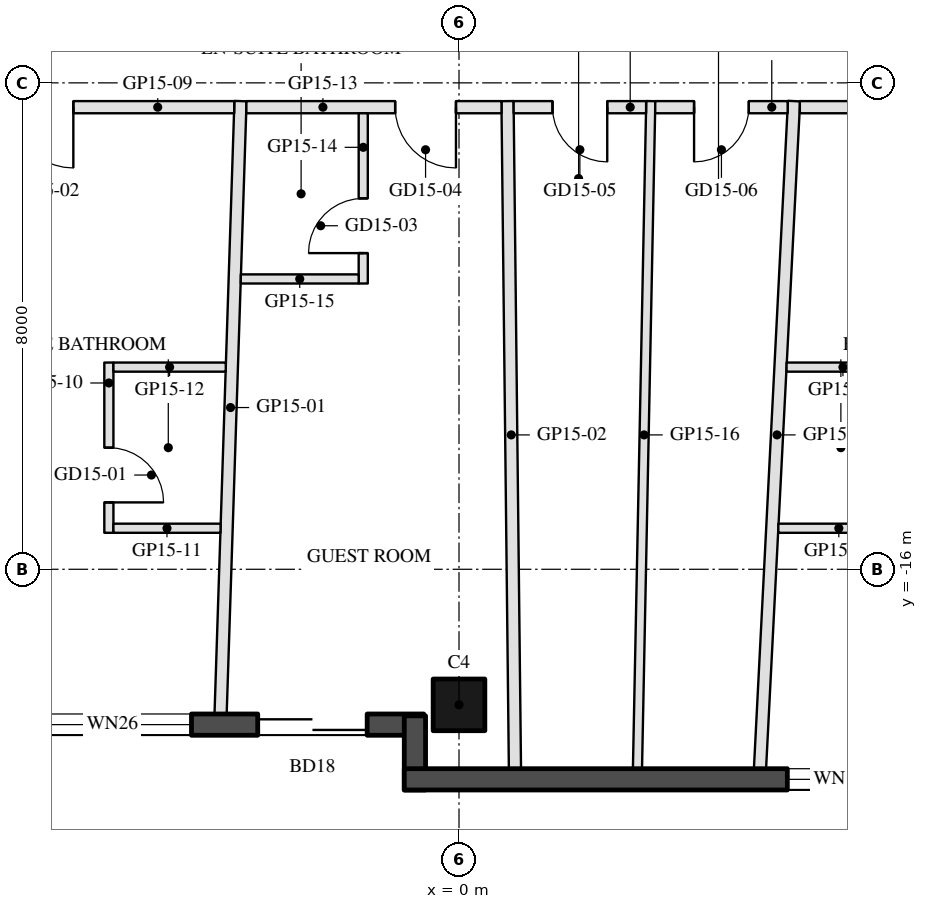
"""IFC4 building model, lengths in metres.
Left out: names, types, materials, properties, quantities, classifications, styles, units other than length and angle.
Written with IfcOpenShell. Run it as: python <this file> out.ifc"""

import sys

from ifc_helpers import new_model, si_unit, direction, frame, frame_2d, origin, origin_2d, place, context, subcontext, project, spatial, rectangle, hollow_rectangle, extrude, element, fill, save


model = new_model("IFC4")
c1 = context("Model", 3, precision=1e-05, world=origin(), true_north=direction((0.0, 1.0)))
c2 = subcontext(c1, "Body", "Model", "MODEL_VIEW")
j1 = project(units=[si_unit("LENGTHUNIT", "METRE"), si_unit("PLANEANGLEUNIT", "RADIAN")], contexts=[c1])
p1 = place(None, origin())
s1 = spatial("IfcSite", under=j1, at=p1, CompositionType="ELEMENT")
p2 = place(p1, origin())
s2 = spatial("IfcBuilding", under=s1, at=p2, CompositionType="ELEMENT")
p3 = place(p2, frame((0.0, 0.0, 168.8)))
s3 = spatial("IfcBuildingStorey", under=s2, at=p3, CompositionType="ELEMENT", Elevation=168.8)
p4 = place(p3, frame((0.0, -18.23, 0.0), z_axis=(0.0, 0.0, 1.0), x_axis=(-1.0, 0.0, 0.0)))
e1 = element("IfcColumn", 1, at=p4, inside=s3, PredefinedType="COLUMN", context=c2, shape_type="SweptSolid", body=[
    extrude(hollow_rectangle(XDim=0.85, YDim=0.85, WallThickness=0.04, at=origin_2d()), origin(), (0.0, 0.0, 1.0), 3.7),
])
p5 = place(p3, frame((-7.32, -18.555, 0.0), z_axis=(0.0, 0.0, 1.0), x_axis=(1.0, 0.0, 0.0)))
e2 = element("IfcWall", 2, at=p5, inside=s3, PredefinedType="SOLIDWALL", context=c2, shape_type="SweptSolid", body=[
    extrude(rectangle(XDim=6.74, YDim=0.35, at=frame_2d((3.37, 0.0))), origin(), (0.0, 0.0, 1.0), 3.55),
])
p6 = place(p5, frame((0.32, 0.0, 0.3)))
e3 = element("IfcOpeningElement", 3, at=p6, cuts=e2, PredefinedType="OPENING", context=c2, shape_type="SweptSolid", body=[
    extrude(rectangle(XDim=2.6, YDim=2.65, at=frame_2d((1.3, 1.325))), frame((0.0, 0.185, 0.0), z_axis=(0.0, -1.0, 0.0), x_axis=(1.0, 0.0, 0.0)), (0.0, 0.0, 1.0), 0.37),
])
p7 = place(p5, frame((4.01, 0.0, 0.0)))
e4 = element("IfcOpeningElement", 4, at=p7, cuts=e2, PredefinedType="OPENING", context=c2, shape_type="SweptSolid", body=[
    extrude(rectangle(XDim=1.8, YDim=2.4, at=frame_2d((0.9, 1.2))), frame((0.0, 0.185, 0.0), z_axis=(0.0, -1.0, 0.0), x_axis=(1.0, 0.0, 0.0)), (0.0, 0.0, 1.0), 0.37),
])
p8 = place(p3, frame((-0.725, -18.41, 0.0), z_axis=(0.0, 0.0, 1.0), x_axis=(0.0, -1.0, 0.0)))
e5 = element("IfcWall", 5, at=p8, inside=s3, PredefinedType="SOLIDWALL", context=c2, shape_type="SweptSolid", body=[
    extrude(rectangle(XDim=1.22, YDim=0.35, at=frame_2d((0.61, 0.0))), origin(), (0.0, 0.0, 1.0), 3.55),
])
p9 = place(p3, frame((-0.9, -19.455, 0.0), z_axis=(0.0, 0.0, 1.0), x_axis=(1.0, 0.0, 0.0)))
e6 = element("IfcWall", 6, at=p9, inside=s3, PredefinedType="SOLIDWALL", context=c2, shape_type="SweptSolid", body=[
    extrude(rectangle(XDim=9.7, YDim=0.35, at=frame_2d((4.85, 0.0))), origin(), (0.0, 0.0, 1.0), 3.55),
])
p10 = place(p9, frame((6.3, 0.0, 0.3)))
e7 = element("IfcOpeningElement", 7, at=p10, cuts=e6, PredefinedType="OPENING", context=c2, shape_type="SweptSolid", body=[
    extrude(rectangle(XDim=1.7, YDim=2.65, at=frame_2d((0.85, 1.325))), frame((0.0, 0.185, 0.0), z_axis=(0.0, -1.0, 0.0), x_axis=(1.0, 0.0, 0.0)), (0.0, 0.0, 1.0), 0.37),
])
p11 = place(p3, frame((-3.921, -18.38, 0.0), z_axis=(0.0, 0.0, 1.0), x_axis=(0.032462838588, 0.999472943161, 0.0)))
e8 = element("IfcWall", 8, at=p11, inside=s3, PredefinedType="PARTITIONING", context=c2, shape_type="SweptSolid", body=[
    extrude(rectangle(XDim=10.085, YDim=0.2, at=frame_2d((5.042, 0.0))), origin(), (0.0, 0.0, 1.0), 2.95),
])
p12 = place(p3, frame((0.92, -19.28, 0.0), z_axis=(0.0, 0.0, 1.0), x_axis=(-0.011116847578, 0.999938205941, 0.0)))
e9 = element("IfcWall", 9, at=p12, inside=s3, PredefinedType="PARTITIONING", context=c2, shape_type="SweptSolid", body=[
    extrude(rectangle(XDim=10.981, YDim=0.2, at=frame_2d((5.49, 0.0))), origin(), (0.0, 0.0, 1.0), 3.06),
])
p13 = place(p3, frame((4.95, -19.28, 0.0), z_axis=(0.0, 0.0, 1.0), x_axis=(0.050963172582, 0.998700533213, 0.0)))
e10 = element("IfcWall", 10, at=p13, inside=s3, PredefinedType="PARTITIONING", context=c2, shape_type="SweptSolid", body=[
    extrude(rectangle(XDim=10.994, YDim=0.2, at=frame_2d((5.497, 0.0))), origin(), (0.0, 0.0, 1.0), 3.06),
])
p14 = place(p3, frame((-3.697, -8.4, 0.0), z_axis=(0.0, 0.0, 1.0), x_axis=(-1.0, 0.0, 0.0)))
e11 = element("IfcWall", 11, at=p14, inside=s3, PredefinedType="PARTITIONING", context=c2, shape_type="SweptSolid", body=[
    extrude(rectangle(XDim=6.292, YDim=0.2, at=frame_2d((3.146, 0.0))), origin(), (0.0, 0.0, 1.0), 2.95),
])
p15 = place(p14, frame((2.646, 0.0, 0.0)))
e12 = element("IfcOpeningElement", 12, at=p15, cuts=e11, PredefinedType="OPENING", context=c2, shape_type="SweptSolid", body=[
    extrude(rectangle(XDim=1.0, YDim=2.1, at=frame_2d((0.5, 1.05))), frame((0.0, 0.11, 0.0), z_axis=(0.0, -1.0, 0.0), x_axis=(1.0, 0.0, 0.0)), (0.0, 0.0, 1.0), 0.22),
])
p16 = place(p3, frame((-5.758, -12.6, 0.0), z_axis=(0.0, 0.0, 1.0), x_axis=(0.0, -1.0, 0.0)))
e13 = element("IfcWall", 13, at=p16, inside=s3, PredefinedType="PARTITIONING", context=c2, shape_type="SweptSolid", body=[
    extrude(rectangle(XDim=2.8, YDim=0.15, at=frame_2d((1.4, 0.0))), origin(), (0.0, 0.0, 1.0), 3.55),
])
p17 = place(p16, frame((1.4, 0.0, 0.0)))
e14 = element("IfcOpeningElement", 14, at=p17, cuts=e13, PredefinedType="OPENING", context=c2, shape_type="SweptSolid", body=[
    extrude(rectangle(XDim=0.9, YDim=2.1, at=frame_2d((0.45, 1.05))), frame((0.0, 0.085, 0.0), z_axis=(0.0, -1.0, 0.0), x_axis=(1.0, 0.0, 0.0)), (0.0, 0.0, 1.0), 0.17),
])
p18 = place(p3, frame((-5.683, -15.325, 0.0), z_axis=(0.0, 0.0, 1.0), x_axis=(1.0, 0.0, 0.0)))
e15 = element("IfcWall", 15, at=p18, inside=s3, PredefinedType="PARTITIONING", context=c2, shape_type="SweptSolid", body=[
    extrude(rectangle(XDim=1.761, YDim=0.15, at=frame_2d((0.881, 0.0))), origin(), (0.0, 0.0, 1.0), 2.95),
])
p19 = place(p3, frame((-5.683, -12.675, 0.0), z_axis=(0.0, 0.0, 1.0), x_axis=(1.0, 0.0, 0.0)))
e16 = element("IfcWall", 16, at=p19, inside=s3, PredefinedType="PARTITIONING", context=c2, shape_type="SweptSolid", body=[
    extrude(rectangle(XDim=1.847, YDim=0.15, at=frame_2d((0.924, 0.0))), origin(), (0.0, 0.0, 1.0), 2.95),
])
p20 = place(p3, frame((0.699, -8.4, 0.0), z_axis=(0.0, 0.0, 1.0), x_axis=(-1.0, 0.0, 0.0)))
e17 = element("IfcWall", 17, at=p20, inside=s3, PredefinedType="PARTITIONING", context=c2, shape_type="SweptSolid", body=[
    extrude(rectangle(XDim=4.196, YDim=0.2, at=frame_2d((2.098, 0.0))), origin(), (0.0, 0.0, 1.0), 2.95),
])
p21 = place(p20, frame((0.749, 0.0, 0.0)))
e18 = element("IfcOpeningElement", 18, at=p21, cuts=e17, PredefinedType="OPENING", context=c2, shape_type="SweptSolid", body=[
    extrude(rectangle(XDim=1.0, YDim=2.1, at=frame_2d((0.5, 1.05))), frame((0.0, 0.11, 0.0), z_axis=(0.0, -1.0, 0.0), x_axis=(1.0, 0.0, 0.0)), (0.0, 0.0, 1.0), 0.22),
])
p22 = place(p3, frame((-1.575, -11.3, 0.0), z_axis=(0.0, 0.0, 1.0), x_axis=(0.0, 1.0, 0.0)))
e19 = element("IfcWall", 19, at=p22, inside=s3, PredefinedType="PARTITIONING", context=c2, shape_type="SweptSolid", body=[
    extrude(rectangle(XDim=2.8, YDim=0.15, at=frame_2d((1.4, 0.0))), origin(), (0.0, 0.0, 1.0), 3.55),
])
p23 = place(p22, frame((0.5, 0.0, 0.0)))
e20 = element("IfcOpeningElement", 20, at=p23, cuts=e19, PredefinedType="OPENING", context=c2, shape_type="SweptSolid", body=[
    extrude(rectangle(XDim=0.9, YDim=2.1, at=frame_2d((0.45, 1.05))), frame((0.0, 0.085, 0.0), z_axis=(0.0, -1.0, 0.0), x_axis=(1.0, 0.0, 0.0)), (0.0, 0.0, 1.0), 0.17),
])
p24 = place(p3, frame((-3.588, -11.225, 0.0), z_axis=(0.0, 0.0, 1.0), x_axis=(1.0, 0.0, 0.0)))
e21 = element("IfcWall", 21, at=p24, inside=s3, PredefinedType="PARTITIONING", context=c2, shape_type="SweptSolid", body=[
    extrude(rectangle(XDim=1.938, YDim=0.15, at=frame_2d((0.969, 0.0))), origin(), (0.0, 0.0, 1.0), 3.55),
])
p25 = place(p3, frame((2.935, -19.28, 0.0), z_axis=(0.0, 0.0, 1.0), x_axis=(0.019940891206, 0.99980116066, 0.0)))
e22 = element("IfcWall", 22, at=p25, inside=s3, PredefinedType="PARTITIONING", context=c2, shape_type="SweptSolid", body=[
    extrude(rectangle(XDim=10.982, YDim=0.15, at=frame_2d((5.491, 0.0))), origin(), (0.0, 0.0, 1.0), 3.06),
])
p26 = place(p3, frame((3.077, -8.4, 0.0), z_axis=(0.0, 0.0, 1.0), x_axis=(-1.0, 0.0, 0.0)))
e23 = element("IfcWall", 23, at=p26, inside=s3, PredefinedType="PARTITIONING", context=c2, shape_type="SweptSolid", body=[
    extrude(rectangle(XDim=2.178, YDim=0.2, at=frame_2d((1.089, 0.0))), origin(), (0.0, 0.0, 1.0), 3.55),
])
p27 = place(p26, frame((0.639, 0.0, 0.0)))
e24 = element("IfcOpeningElement", 24, at=p27, cuts=e23, PredefinedType="OPENING", context=c2, shape_type="SweptSolid", body=[
    extrude(rectangle(XDim=0.9, YDim=2.1, at=frame_2d((0.45, 1.05))), frame((0.0, 0.11, 0.0), z_axis=(0.0, -1.0, 0.0), x_axis=(1.0, 0.0, 0.0)), (0.0, 0.0, 1.0), 0.22),
])
p28 = place(p3, frame((5.405, -8.4, 0.0), z_axis=(0.0, 0.0, 1.0), x_axis=(-1.0, 0.0, 0.0)))
e25 = element("IfcWall", 25, at=p28, inside=s3, PredefinedType="PARTITIONING", context=c2, shape_type="SweptSolid", body=[
    extrude(rectangle(XDim=2.178, YDim=0.2, at=frame_2d((1.089, 0.0))), origin(), (0.0, 0.0, 1.0), 2.95),
])
p29 = place(p28, frame((0.639, 0.0, 0.0)))
e26 = element("IfcOpeningElement", 26, at=p29, cuts=e25, PredefinedType="OPENING", context=c2, shape_type="SweptSolid", body=[
    extrude(rectangle(XDim=0.9, YDim=2.1, at=frame_2d((0.45, 1.05))), frame((0.0, 0.11, 0.0), z_axis=(0.0, -1.0, 0.0), x_axis=(1.0, 0.0, 0.0)), (0.0, 0.0, 1.0), 0.22),
])
p30 = place(p3, frame((9.988, -8.4, 0.0), z_axis=(0.0, 0.0, 1.0), x_axis=(-1.0, 0.0, 0.0)))
e27 = element("IfcWall", 27, at=p30, inside=s3, PredefinedType="PARTITIONING", context=c2, shape_type="SweptSolid", body=[
    extrude(rectangle(XDim=4.383, YDim=0.2, at=frame_2d((2.191, 0.0))), origin(), (0.0, 0.0, 1.0), 2.95),
])
p31 = place(p30, frame((1.691, 0.0, 0.0)))
e28 = element("IfcOpeningElement", 28, at=p31, cuts=e27, PredefinedType="OPENING", context=c2, shape_type="SweptSolid", body=[
    extrude(rectangle(XDim=1.0, YDim=2.1, at=frame_2d((0.5, 1.05))), frame((0.0, 0.11, 0.0), z_axis=(0.0, -1.0, 0.0), x_axis=(1.0, 0.0, 0.0)), (0.0, 0.0, 1.0), 0.22),
])
p32 = place(p3, frame((5.252, -15.325, 0.0), z_axis=(0.0, 0.0, 1.0), x_axis=(1.0, 0.0, 0.0)))
e29 = element("IfcWall", 29, at=p32, inside=s3, PredefinedType="PARTITIONING", context=c2, shape_type="SweptSolid", body=[
    extrude(rectangle(XDim=1.989, YDim=0.15, at=frame_2d((0.995, 0.0))), origin(), (0.0, 0.0, 1.0), 3.55),
])
p33 = place(p3, frame((5.387, -12.675, 0.0), z_axis=(0.0, 0.0, 1.0), x_axis=(1.0, 0.0, 0.0)))
e30 = element("IfcWall", 30, at=p33, inside=s3, PredefinedType="PARTITIONING", context=c2, shape_type="SweptSolid", body=[
    extrude(rectangle(XDim=1.854, YDim=0.15, at=frame_2d((0.927, 0.0))), origin(), (0.0, 0.0, 1.0), 3.55),
])
p34 = place(p6, origin())
e31 = element("IfcWindow", 31, at=p34, inside=s3, PartitioningType="SINGLE_PANEL", PredefinedType="WINDOW", context=c2, shape_type="SweptSolid", body=[
    extrude(rectangle(XDim=2.6, YDim=2.65, at=frame_2d((1.3, 1.325))), frame((0.0, 0.03, 0.0), z_axis=(0.0, -1.0, 0.0), x_axis=(1.0, 0.0, 0.0)), (0.0, 0.0, 1.0), 0.06),
])
fill(e3, e31)
p35 = place(p7, frame((1.8, 0.0, 0.0), z_axis=(0.0, 0.0, 1.0), x_axis=(-1.0, 0.0, 0.0)))
e32 = element("IfcDoor", 32, at=p35, inside=s3, OperationType="SLIDING_TO_LEFT", PredefinedType="DOOR", context=c2, shape_type="SweptSolid", body=[
    extrude(rectangle(XDim=1.8, YDim=2.4, at=frame_2d((0.9, 1.2))), frame((0.0, 0.025, 0.0), z_axis=(0.0, -1.0, 0.0), x_axis=(1.0, 0.0, 0.0)), (0.0, 0.0, 1.0), 0.05),
])
fill(e4, e32)
p36 = place(p10, origin())
e33 = element("IfcWindow", 33, at=p36, inside=s3, PartitioningType="SINGLE_PANEL", PredefinedType="WINDOW", context=c2, shape_type="SweptSolid", body=[
    extrude(rectangle(XDim=1.7, YDim=2.65, at=frame_2d((0.85, 1.325))), frame((0.0, 0.03, 0.0), z_axis=(0.0, -1.0, 0.0), x_axis=(1.0, 0.0, 0.0)), (0.0, 0.0, 1.0), 0.06),
])
fill(e7, e33)
p37 = place(p17, origin())
e34 = element("IfcDoor", 34, at=p37, inside=s3, OperationType="SINGLE_SWING_RIGHT", PredefinedType="DOOR", context=c2, shape_type="SweptSolid", body=[
    extrude(rectangle(XDim=0.9, YDim=2.1, at=frame_2d((0.45, 1.05))), frame((0.0, 0.025, 0.0), z_axis=(0.0, -1.0, 0.0), x_axis=(1.0, 0.0, 0.0)), (0.0, 0.0, 1.0), 0.05),
])
fill(e14, e34)
p38 = place(p15, origin())
e35 = element("IfcDoor", 35, at=p38, inside=s3, OperationType="SINGLE_SWING_LEFT", PredefinedType="DOOR", context=c2, shape_type="SweptSolid", body=[
    extrude(rectangle(XDim=1.0, YDim=2.1, at=frame_2d((0.5, 1.05))), frame((0.0, 0.025, 0.0), z_axis=(0.0, -1.0, 0.0), x_axis=(1.0, 0.0, 0.0)), (0.0, 0.0, 1.0), 0.05),
])
fill(e12, e35)
p39 = place(p23, origin())
e36 = element("IfcDoor", 36, at=p39, inside=s3, OperationType="SINGLE_SWING_LEFT", PredefinedType="DOOR", context=c2, shape_type="SweptSolid", body=[
    extrude(rectangle(XDim=0.9, YDim=2.1, at=frame_2d((0.45, 1.05))), frame((0.0, 0.025, 0.0), z_axis=(0.0, -1.0, 0.0), x_axis=(1.0, 0.0, 0.0)), (0.0, 0.0, 1.0), 0.05),
])
fill(e20, e36)
p40 = place(p21, origin())
e37 = element("IfcDoor", 37, at=p40, inside=s3, OperationType="SINGLE_SWING_LEFT", PredefinedType="DOOR", context=c2, shape_type="SweptSolid", body=[
    extrude(rectangle(XDim=1.0, YDim=2.1, at=frame_2d((0.5, 1.05))), frame((0.0, 0.025, 0.0), z_axis=(0.0, -1.0, 0.0), x_axis=(1.0, 0.0, 0.0)), (0.0, 0.0, 1.0), 0.05),
])
fill(e18, e37)
p41 = place(p27, origin())
e38 = element("IfcDoor", 38, at=p41, inside=s3, OperationType="SINGLE_SWING_LEFT", PredefinedType="DOOR", context=c2, shape_type="SweptSolid", body=[
    extrude(rectangle(XDim=0.9, YDim=2.1, at=frame_2d((0.45, 1.05))), frame((0.0, 0.025, 0.0), z_axis=(0.0, -1.0, 0.0), x_axis=(1.0, 0.0, 0.0)), (0.0, 0.0, 1.0), 0.05),
])
fill(e24, e38)
p42 = place(p29, origin())
e39 = element("IfcDoor", 39, at=p42, inside=s3, OperationType="SINGLE_SWING_RIGHT", PredefinedType="DOOR", context=c2, shape_type="SweptSolid", body=[
    extrude(rectangle(XDim=0.9, YDim=2.1, at=frame_2d((0.45, 1.05))), frame((0.0, 0.025, 0.0), z_axis=(0.0, -1.0, 0.0), x_axis=(1.0, 0.0, 0.0)), (0.0, 0.0, 1.0), 0.05),
])
fill(e26, e39)
save(model, sys.argv[1])
